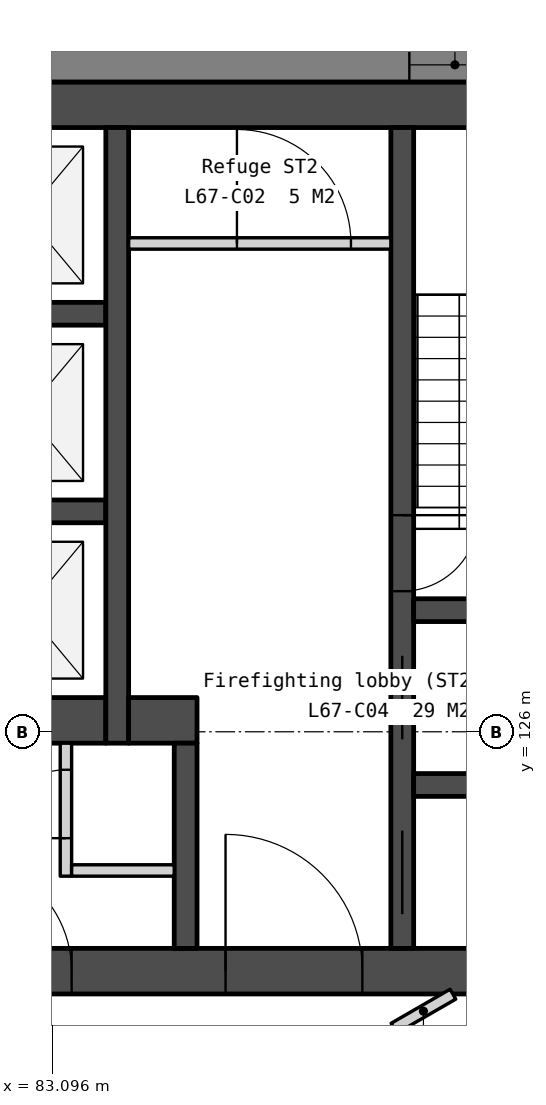
"""IFC4 building model, lengths in metres.
Left out: names, types, materials, properties, quantities, classifications, styles, units other than length and angle.
Written with IfcOpenShell. Run it as: python <this file> out.ifc"""

import sys

from ifc_helpers import new_model, si_unit, direction, frame, frame_2d, origin, place, context, subcontext, project, spatial, polyline, rectangle, outline, extrude, element, fill, save


model = new_model("IFC4")
c1 = context("Model", 3, precision=1e-05, world=origin(), true_north=direction((0.0, 1.0)))
c2 = subcontext(c1, "Body", "Model", "MODEL_VIEW")
j1 = project(units=[si_unit("LENGTHUNIT", "METRE"), si_unit("PLANEANGLEUNIT", "RADIAN")], contexts=[c1])
p1 = place(None, origin())
s1 = spatial("IfcSite", under=j1, at=p1, CompositionType="ELEMENT")
p2 = place(p1, origin())
s2 = spatial("IfcBuilding", under=s1, at=p2, CompositionType="ELEMENT")
p3 = place(p2, frame((0.0, 0.0, 273.8)))
s3 = spatial("IfcBuildingStorey", under=s2, at=p3, CompositionType="ELEMENT", Elevation=273.8)
p4 = place(p3, frame((69.0, 134.25, 0.0), z_axis=(0.0, 0.0, 1.0), x_axis=(1.0, 0.0, 0.0)))
e1 = element("IfcWall", 1, at=p4, inside=s3, PredefinedType="SOLIDWALL", context=c2, shape_type="SweptSolid", body=[
    extrude(rectangle(XDim=22.0, YDim=0.6, at=frame_2d((11.0, 0.0))), origin(), (0.0, 0.0, 1.0), 3.75),
])
p5 = place(p3, frame((69.0, 122.85, 0.0), z_axis=(0.0, 0.0, 1.0), x_axis=(1.0, 0.0, 0.0)))
e2 = element("IfcWall", 2, at=p5, inside=s3, PredefinedType="SOLIDWALL", context=c2, shape_type="SweptSolid", body=[
    extrude(rectangle(XDim=22.0, YDim=0.6, at=frame_2d((11.0, 0.0))), origin(), (0.0, 0.0, 1.0), 3.75),
])
p6 = place(p5, frame((16.375, 0.0, 0.0)))
e3 = element("IfcOpeningElement", 3, at=p6, cuts=e2, PredefinedType="OPENING", context=c2, shape_type="SweptSolid", body=[
    extrude(rectangle(XDim=1.8, YDim=2.1, at=frame_2d((0.9, 1.05))), frame((0.0, 0.31, 0.0), z_axis=(0.0, -1.0, 0.0), x_axis=(1.0, 0.0, 0.0)), (0.0, 0.0, 1.0), 0.62),
])
p7 = place(p5, frame((3.825, 0.0, 0.0)))
e4 = element("IfcOpeningElement", 4, at=p7, cuts=e2, PredefinedType="OPENING", context=c2, shape_type="SweptSolid", body=[
    extrude(rectangle(XDim=1.8, YDim=2.1, at=frame_2d((0.9, 1.05))), frame((0.0, 0.31, 0.0), z_axis=(0.0, -1.0, 0.0), x_axis=(1.0, 0.0, 0.0)), (0.0, 0.0, 1.0), 0.62),
])
p8 = place(p5, frame((12.85, 0.0, 0.0)))
e5 = element("IfcOpeningElement", 5, at=p8, cuts=e2, PredefinedType="OPENING", context=c2, shape_type="SweptSolid", body=[
    extrude(rectangle(XDim=1.5, YDim=2.1, at=frame_2d((0.75, 1.05))), frame((0.0, 0.31, 0.0), z_axis=(0.0, -1.0, 0.0), x_axis=(1.0, 0.0, 0.0)), (0.0, 0.0, 1.0), 0.62),
])
for number, where, z_axis, x_axis in (
    (6, (81.7, 131.5, 0.0), (0.0, 0.0, 1.0), (1.0, 0.0, 0.0)),
    (7, (81.7, 128.9, 0.0), (0.0, 0.0, 1.0), (1.0, 0.0, 0.0)),
):
    element("IfcWall", number, at=place(p3, frame(where, z_axis=z_axis, x_axis=x_axis)), inside=s3, PredefinedType="SOLIDWALL", context=c2, shape_type="SweptSolid", body=[
        extrude(rectangle(XDim=2.1, YDim=0.3, at=frame_2d((1.05, 0.0))), origin(), (0.0, 0.0, 1.0), 3.75),
    ])
p9 = place(p3, frame((82.9, 126.15, 0.0), z_axis=(0.0, 0.0, 1.0), x_axis=(1.0, 0.0, 0.0)))
e8 = element("IfcWall", 8, at=p9, inside=s3, PredefinedType="SOLIDWALL", context=c2, shape_type="SweptSolid", body=[
    extrude(rectangle(XDim=0.9, YDim=0.6, at=frame_2d((0.45, 0.0))), origin(), (0.0, 0.0, 1.0), 3.75),
])
p10 = place(p3, frame((83.275, 125.85, 0.0), z_axis=(0.0, 0.0, 1.0), x_axis=(0.0, -1.0, 0.0)))
e9 = element("IfcWall", 9, at=p10, inside=s3, PredefinedType="PARTITIONING", context=c2, shape_type="SweptSolid", body=[
    extrude(rectangle(XDim=1.75, YDim=0.15, at=frame_2d((0.875, 0.0))), origin(), (0.0, 0.0, 1.0), 3.75),
])
p11 = place(p10, frame((0.35, 0.0, 0.0)))
e10 = element("IfcOpeningElement", 10, at=p11, cuts=e9, PredefinedType="OPENING", context=c2, shape_type="SweptSolid", body=[
    extrude(rectangle(XDim=0.9, YDim=2.1, at=frame_2d((0.45, 1.05))), frame((0.0, 0.085, 0.0), z_axis=(0.0, -1.0, 0.0), x_axis=(1.0, 0.0, 0.0)), (0.0, 0.0, 1.0), 0.17),
])
p12 = place(p3, frame((83.35, 124.175, 0.0), z_axis=(0.0, 0.0, 1.0), x_axis=(1.0, 0.0, 0.0)))
e11 = element("IfcWall", 11, at=p12, inside=s3, PredefinedType="PARTITIONING", context=c2, shape_type="SweptSolid", body=[
    extrude(rectangle(XDim=1.35, YDim=0.15, at=frame_2d((0.675, 0.0))), origin(), (0.0, 0.0, 1.0), 3.75),
])
p13 = place(p3, frame((83.95, 133.95, 0.0), z_axis=(0.0, 0.0, 1.0), x_axis=(0.0, -1.0, 0.0)))
e12 = element("IfcWall", 12, at=p13, inside=s3, PredefinedType="SOLIDWALL", context=c2, shape_type="SweptSolid", body=[
    extrude(rectangle(XDim=8.1, YDim=0.3, at=frame_2d((4.05, 0.0))), origin(), (0.0, 0.0, 1.0), 3.75),
])
p14 = place(p3, frame((84.1, 132.425, 0.0), z_axis=(0.0, 0.0, 1.0), x_axis=(1.0, 0.0, 0.0)))
e13 = element("IfcWall", 13, at=p14, inside=s3, PredefinedType="PARTITIONING", context=c2, shape_type="SweptSolid", body=[
    extrude(rectangle(XDim=3.45, YDim=0.15, at=frame_2d((1.725, 0.0))), origin(), (0.0, 0.0, 1.0), 3.75),
])
p15 = place(p14, frame((1.425, 0.0, 0.0)))
e14 = element("IfcOpeningElement", 14, at=p15, cuts=e13, PredefinedType="OPENING", context=c2, shape_type="SweptSolid", body=[
    extrude(rectangle(XDim=1.5, YDim=2.1, at=frame_2d((0.75, 1.05))), frame((0.0, 0.085, 0.0), z_axis=(0.0, -1.0, 0.0), x_axis=(1.0, 0.0, 0.0)), (0.0, 0.0, 1.0), 0.17),
])
p16 = place(p3, frame((84.1, 126.15, 0.0), z_axis=(0.0, 0.0, 1.0), x_axis=(1.0, 0.0, 0.0)))
e15 = element("IfcWall", 15, at=p16, inside=s3, PredefinedType="SOLIDWALL", context=c2, shape_type="SweptSolid", body=[
    extrude(rectangle(XDim=0.9, YDim=0.6, at=frame_2d((0.45, 0.0))), origin(), (0.0, 0.0, 1.0), 3.75),
])
p17 = place(p3, frame((84.85, 125.85, 0.0), z_axis=(0.0, 0.0, 1.0), x_axis=(0.0, -1.0, 0.0)))
e16 = element("IfcWall", 16, at=p17, inside=s3, PredefinedType="SOLIDWALL", context=c2, shape_type="SweptSolid", body=[
    extrude(rectangle(XDim=2.7, YDim=0.3, at=frame_2d((1.35, 0.0))), origin(), (0.0, 0.0, 1.0), 3.75),
])
p18 = place(p3, frame((87.7, 133.95, 0.0), z_axis=(0.0, 0.0, 1.0), x_axis=(0.0, -1.0, 0.0)))
e17 = element("IfcWall", 17, at=p18, inside=s3, PredefinedType="SOLIDWALL", context=c2, shape_type="SweptSolid", body=[
    extrude(rectangle(XDim=10.8, YDim=0.3, at=frame_2d((5.4, 0.0))), origin(), (0.0, 0.0, 1.0), 3.75),
])
p19 = place(p18, frame((6.95, 0.0, 0.0)))
e18 = element("IfcOpeningElement", 18, at=p19, cuts=e17, PredefinedType="OPENING", context=c2, shape_type="SweptSolid", body=[
    extrude(rectangle(XDim=1.1, YDim=2.1, at=frame_2d((0.55, 1.05))), frame((0.0, 0.16, 0.0), z_axis=(0.0, -1.0, 0.0), x_axis=(1.0, 0.0, 0.0)), (0.0, 0.0, 1.0), 0.32),
])
p20 = place(p18, frame((5.1, 0.0, 0.0)))
e19 = element("IfcOpeningElement", 19, at=p20, cuts=e17, PredefinedType="OPENING", context=c2, shape_type="SweptSolid", body=[
    extrude(rectangle(XDim=1.0, YDim=2.1, at=frame_2d((0.5, 1.05))), frame((0.0, 0.16, 0.0), z_axis=(0.0, -1.0, 0.0), x_axis=(1.0, 0.0, 0.0)), (0.0, 0.0, 1.0), 0.32),
])
p21 = place(p18, frame((9.25, 0.0, 0.0)))
e20 = element("IfcOpeningElement", 20, at=p21, cuts=e17, PredefinedType="OPENING", context=c2, shape_type="SweptSolid", body=[
    extrude(rectangle(XDim=1.1, YDim=2.1, at=frame_2d((0.55, 1.05))), frame((0.0, 0.16, 0.0), z_axis=(0.0, -1.0, 0.0), x_axis=(1.0, 0.0, 0.0)), (0.0, 0.0, 1.0), 0.32),
])
for number, where, z_axis, x_axis in (
    (21, (87.85, 127.6, 0.0), (0.0, 0.0, 1.0), (1.0, 0.0, 0.0)),
    (22, (87.85, 125.3, 0.0), (0.0, 0.0, 1.0), (1.0, 0.0, 0.0)),
):
    element("IfcWall", number, at=place(p3, frame(where, z_axis=z_axis, x_axis=x_axis)), inside=s3, PredefinedType="SOLIDWALL", context=c2, shape_type="SweptSolid", body=[
        extrude(rectangle(XDim=2.55, YDim=0.3, at=frame_2d((1.275, 0.0))), origin(), (0.0, 0.0, 1.0), 3.75),
    ])
p22 = place(p3, frame((98.486, 134.775, -0.15), z_axis=(0.0, 0.0, 1.0), x_axis=(-1.0, 0.0, 0.0)))
e23 = element("IfcWall", 23, at=p22, inside=s3, PredefinedType="SOLIDWALL", context=c2, shape_type="SweptSolid", body=[
    extrude(outline(polyline([(36.972, 0.0), (36.972, 3.9), (0.0, 3.9), (0.0, 0.0), (36.972, 0.0)])), frame((0.0, 0.225, 0.0), z_axis=(0.0, -1.0, 0.0), x_axis=(1.0, 0.0, 0.0)), (0.0, 0.0, 1.0), 0.45),
])
p23 = place(p22, frame((0.715, 0.0, 0.95)))
e24 = element("IfcOpeningElement", 24, at=p23, cuts=e23, PredefinedType="OPENING", context=c2, shape_type="SweptSolid", body=[
    extrude(rectangle(XDim=1.2, YDim=2.2, at=frame_2d((0.6, 1.1))), frame((0.0, 0.235, 0.0), z_axis=(0.0, -1.0, 0.0), x_axis=(1.0, 0.0, 0.0)), (0.0, 0.0, 1.0), 0.47),
])
p24 = place(p22, frame((7.793, 0.0, 0.95)))
e25 = element("IfcOpeningElement", 25, at=p24, cuts=e23, PredefinedType="OPENING", context=c2, shape_type="SweptSolid", body=[
    extrude(rectangle(XDim=1.2, YDim=2.2, at=frame_2d((0.6, 1.1))), frame((0.0, 0.235, 0.0), z_axis=(0.0, -1.0, 0.0), x_axis=(1.0, 0.0, 0.0)), (0.0, 0.0, 1.0), 0.47),
])
p25 = place(p22, frame((9.493, 0.0, 0.95)))
e26 = element("IfcOpeningElement", 26, at=p25, cuts=e23, PredefinedType="OPENING", context=c2, shape_type="SweptSolid", body=[
    extrude(rectangle(XDim=1.2, YDim=2.2, at=frame_2d((0.6, 1.1))), frame((0.0, 0.235, 0.0), z_axis=(0.0, -1.0, 0.0), x_axis=(1.0, 0.0, 0.0)), (0.0, 0.0, 1.0), 0.47),
])
p26 = place(p22, frame((17.036, 0.0, 0.95)))
e27 = element("IfcOpeningElement", 27, at=p26, cuts=e23, PredefinedType="OPENING", context=c2, shape_type="SweptSolid", body=[
    extrude(rectangle(XDim=1.2, YDim=2.2, at=frame_2d((0.6, 1.1))), frame((0.0, 0.235, 0.0), z_axis=(0.0, -1.0, 0.0), x_axis=(1.0, 0.0, 0.0)), (0.0, 0.0, 1.0), 0.47),
])
p27 = place(p22, frame((18.736, 0.0, 0.95)))
e28 = element("IfcOpeningElement", 28, at=p27, cuts=e23, PredefinedType="OPENING", context=c2, shape_type="SweptSolid", body=[
    extrude(rectangle(XDim=1.2, YDim=2.2, at=frame_2d((0.6, 1.1))), frame((0.0, 0.235, 0.0), z_axis=(0.0, -1.0, 0.0), x_axis=(1.0, 0.0, 0.0)), (0.0, 0.0, 1.0), 0.47),
])
p28 = place(p22, frame((26.279, 0.0, 0.95)))
e29 = element("IfcOpeningElement", 29, at=p28, cuts=e23, PredefinedType="OPENING", context=c2, shape_type="SweptSolid", body=[
    extrude(rectangle(XDim=1.2, YDim=2.2, at=frame_2d((0.6, 1.1))), frame((0.0, 0.235, 0.0), z_axis=(0.0, -1.0, 0.0), x_axis=(1.0, 0.0, 0.0)), (0.0, 0.0, 1.0), 0.47),
])
p29 = place(p22, frame((27.979, 0.0, 0.95)))
e30 = element("IfcOpeningElement", 30, at=p29, cuts=e23, PredefinedType="OPENING", context=c2, shape_type="SweptSolid", body=[
    extrude(rectangle(XDim=1.2, YDim=2.2, at=frame_2d((0.6, 1.1))), frame((0.0, 0.235, 0.0), z_axis=(0.0, -1.0, 0.0), x_axis=(1.0, 0.0, 0.0)), (0.0, 0.0, 1.0), 0.47),
])
p30 = place(p22, frame((35.058, 0.0, 0.95)))
e31 = element("IfcOpeningElement", 31, at=p30, cuts=e23, PredefinedType="OPENING", context=c2, shape_type="SweptSolid", body=[
    extrude(rectangle(XDim=1.2, YDim=2.2, at=frame_2d((0.6, 1.1))), frame((0.0, 0.235, 0.0), z_axis=(0.0, -1.0, 0.0), x_axis=(1.0, 0.0, 0.0)), (0.0, 0.0, 1.0), 0.47),
])
p31 = place(p3, frame((86.427, 110.752, -0.15), z_axis=(0.0, 0.0, 1.0), x_axis=(0.500000383388, 0.866025182435, 0.0)))
e32 = element("IfcWall", 32, at=p31, inside=s3, PredefinedType="SOLIDWALL", context=c2, shape_type="SweptSolid", body=[
    extrude(outline(polyline([(25.929, 3.9), (25.929, 0.0), (0.0, 0.0), (0.0, 3.9), (25.929, 3.9)])), frame((0.0, 0.225, 0.0), z_axis=(0.0, -1.0, 0.0), x_axis=(1.0, 0.0, 0.0)), (0.0, 0.0, 1.0), 0.45),
])
p32 = place(p31, frame((5.993, 0.0, 0.95)))
e33 = element("IfcOpeningElement", 33, at=p32, cuts=e32, PredefinedType="OPENING", context=c2, shape_type="SweptSolid", body=[
    extrude(rectangle(XDim=1.2, YDim=2.2, at=frame_2d((0.6, 1.1))), frame((0.0, 0.235, 0.0), z_axis=(0.0, -1.0, 0.0), x_axis=(1.0, 0.0, 0.0)), (0.0, 0.0, 1.0), 0.47),
])
p33 = place(p31, frame((7.693, 0.0, 0.95)))
e34 = element("IfcOpeningElement", 34, at=p33, cuts=e32, PredefinedType="OPENING", context=c2, shape_type="SweptSolid", body=[
    extrude(rectangle(XDim=1.2, YDim=2.2, at=frame_2d((0.6, 1.1))), frame((0.0, 0.235, 0.0), z_axis=(0.0, -1.0, 0.0), x_axis=(1.0, 0.0, 0.0)), (0.0, 0.0, 1.0), 0.47),
])
p34 = place(p31, frame((15.236, 0.0, 0.95)))
e35 = element("IfcOpeningElement", 35, at=p34, cuts=e32, PredefinedType="OPENING", context=c2, shape_type="SweptSolid", body=[
    extrude(rectangle(XDim=1.2, YDim=2.2, at=frame_2d((0.6, 1.1))), frame((0.0, 0.235, 0.0), z_axis=(0.0, -1.0, 0.0), x_axis=(1.0, 0.0, 0.0)), (0.0, 0.0, 1.0), 0.47),
])
p35 = place(p31, frame((16.936, 0.0, 0.95)))
e36 = element("IfcOpeningElement", 36, at=p35, cuts=e32, PredefinedType="OPENING", context=c2, shape_type="SweptSolid", body=[
    extrude(rectangle(XDim=1.2, YDim=2.2, at=frame_2d((0.6, 1.1))), frame((0.0, 0.235, 0.0), z_axis=(0.0, -1.0, 0.0), x_axis=(1.0, 0.0, 0.0)), (0.0, 0.0, 1.0), 0.47),
])
p36 = place(p31, frame((24.015, 0.0, 0.95)))
e37 = element("IfcOpeningElement", 37, at=p36, cuts=e32, PredefinedType="OPENING", context=c2, shape_type="SweptSolid", body=[
    extrude(rectangle(XDim=1.2, YDim=2.2, at=frame_2d((0.6, 1.1))), frame((0.0, 0.235, 0.0), z_axis=(0.0, -1.0, 0.0), x_axis=(1.0, 0.0, 0.0)), (0.0, 0.0, 1.0), 0.47),
])
p37 = place(p3, frame((87.591, 122.099, 0.0), z_axis=(0.0, 0.0, 1.0), x_axis=(0.866072174983, 0.499918981156, 0.0)))
e38 = element("IfcWall", 38, at=p37, inside=s3, PredefinedType="PARTITIONING", context=c2, shape_type="SweptSolid", body=[
    extrude(rectangle(XDim=0.896, YDim=0.15, at=frame_2d((0.448, 0.0))), origin(), (0.0, 0.0, 1.0), 3.75),
])
p38 = place(p19, origin())
e39 = element("IfcDoor", 39, at=p38, inside=s3, OperationType="SLIDING_TO_LEFT", PredefinedType="DOOR", context=c2, shape_type="SweptSolid", body=[
    extrude(rectangle(XDim=1.1, YDim=2.1, at=frame_2d((0.55, 1.05))), frame((0.0, 0.025, 0.0), z_axis=(0.0, -1.0, 0.0), x_axis=(1.0, 0.0, 0.0)), (0.0, 0.0, 1.0), 0.05),
])
fill(e18, e39)
p39 = place(p6, origin())
e40 = element("IfcDoor", 40, at=p39, inside=s3, OperationType="DOUBLE_DOOR_DOUBLE_SWING", PredefinedType="DOOR", context=c2, shape_type="SweptSolid", body=[
    extrude(rectangle(XDim=1.8, YDim=2.1, at=frame_2d((0.9, 1.05))), frame((0.0, 0.025, 0.0), z_axis=(0.0, -1.0, 0.0), x_axis=(1.0, 0.0, 0.0)), (0.0, 0.0, 1.0), 0.05),
])
fill(e3, e40)
p40 = place(p8, origin())
e41 = element("IfcDoor", 41, at=p40, inside=s3, OperationType="DOUBLE_DOOR_DOUBLE_SWING", PredefinedType="DOOR", context=c2, shape_type="SweptSolid", body=[
    extrude(rectangle(XDim=1.5, YDim=2.1, at=frame_2d((0.75, 1.05))), frame((0.0, 0.025, 0.0), z_axis=(0.0, -1.0, 0.0), x_axis=(1.0, 0.0, 0.0)), (0.0, 0.0, 1.0), 0.05),
])
fill(e5, e41)
p41 = place(p11, origin())
e42 = element("IfcDoor", 42, at=p41, inside=s3, OperationType="SINGLE_SWING_RIGHT", PredefinedType="DOOR", context=c2, shape_type="SweptSolid", body=[
    extrude(rectangle(XDim=0.9, YDim=2.1, at=frame_2d((0.45, 1.05))), frame((0.0, 0.025, 0.0), z_axis=(0.0, -1.0, 0.0), x_axis=(1.0, 0.0, 0.0)), (0.0, 0.0, 1.0), 0.05),
])
fill(e10, e42)
p42 = place(p15, origin())
e43 = element("IfcDoor", 43, at=p42, inside=s3, OperationType="DOUBLE_DOOR_DOUBLE_SWING", PredefinedType="DOOR", context=c2, shape_type="SweptSolid", body=[
    extrude(rectangle(XDim=1.5, YDim=2.1, at=frame_2d((0.75, 1.05))), frame((0.0, 0.025, 0.0), z_axis=(0.0, -1.0, 0.0), x_axis=(1.0, 0.0, 0.0)), (0.0, 0.0, 1.0), 0.05),
])
fill(e14, e43)
p43 = place(p20, origin())
e44 = element("IfcDoor", 44, at=p43, inside=s3, OperationType="SINGLE_SWING_LEFT", PredefinedType="DOOR", context=c2, shape_type="SweptSolid", body=[
    extrude(rectangle(XDim=1.0, YDim=2.1, at=frame_2d((0.5, 1.05))), frame((0.0, 0.025, 0.0), z_axis=(0.0, -1.0, 0.0), x_axis=(1.0, 0.0, 0.0)), (0.0, 0.0, 1.0), 0.05),
])
fill(e19, e44)
p44 = place(p21, origin())
e45 = element("IfcDoor", 45, at=p44, inside=s3, OperationType="SLIDING_TO_LEFT", PredefinedType="DOOR", context=c2, shape_type="SweptSolid", body=[
    extrude(rectangle(XDim=1.1, YDim=2.1, at=frame_2d((0.55, 1.05))), frame((0.0, 0.025, 0.0), z_axis=(0.0, -1.0, 0.0), x_axis=(1.0, 0.0, 0.0)), (0.0, 0.0, 1.0), 0.05),
])
fill(e20, e45)
p45 = place(p25, origin())
e46 = element("IfcWindow", 46, at=p45, inside=s3, PartitioningType="SINGLE_PANEL", PredefinedType="WINDOW", context=c2, shape_type="SweptSolid", body=[
    extrude(rectangle(XDim=1.2, YDim=2.2, at=frame_2d((0.6, 1.1))), frame((0.0, 0.03, 0.0), z_axis=(0.0, -1.0, 0.0), x_axis=(1.0, 0.0, 0.0)), (0.0, 0.0, 1.0), 0.06),
])
fill(e26, e46)
save(model, sys.argv[1])
